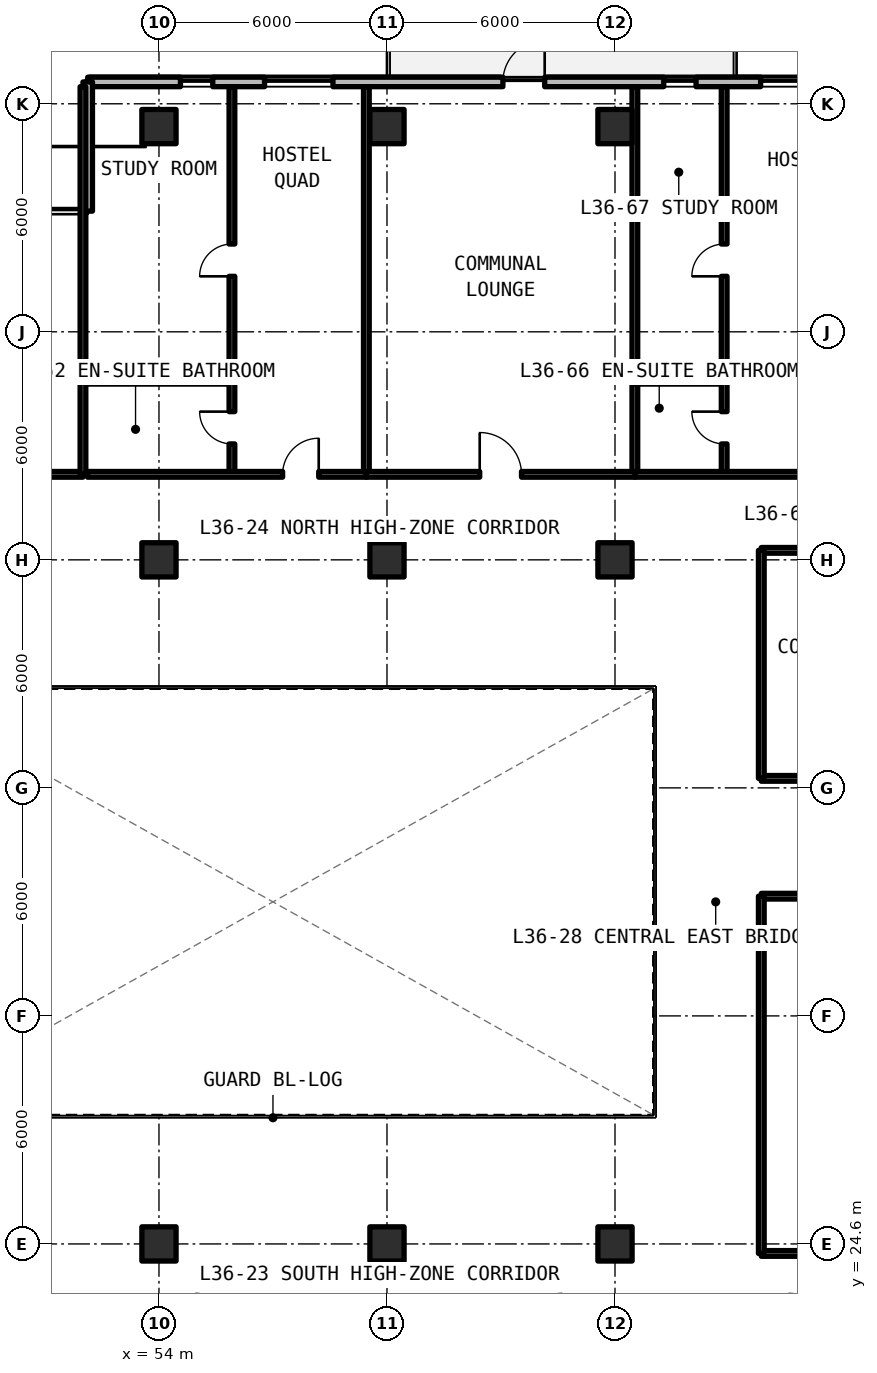
"""IFC4 building model, lengths in metres.
Left out: names, types, materials, properties, quantities, classifications, styles, units other than length and angle.
Written with IfcOpenShell. Run it as: python <this file> out.ifc"""

import sys

from ifc_helpers import new_model, si_unit, direction, frame, frame_2d, origin, origin_2d, place, context, subcontext, project, spatial, rectangle, extrude, element, fill, save


model = new_model("IFC4")
c1 = context("Model", 3, precision=1e-05, world=origin(), true_north=direction((0.0, 1.0)))
c2 = subcontext(c1, "Body", "Model", "MODEL_VIEW")
j1 = project(units=[si_unit("LENGTHUNIT", "METRE"), si_unit("PLANEANGLEUNIT", "RADIAN")], contexts=[c1])
p1 = place(None, origin())
s1 = spatial("IfcSite", under=j1, at=p1, CompositionType="ELEMENT")
p2 = place(p1, origin())
s2 = spatial("IfcBuilding", under=s1, at=p2, CompositionType="ELEMENT")
p3 = place(p2, frame((0.0, 0.0, 132.0)))
s3 = spatial("IfcBuildingStorey", under=s2, at=p3, CompositionType="ELEMENT", Elevation=132.0)
for number, where, z_axis, x_axis in (
    (1, (54.0, 24.6, 0.0), (0.0, 0.0, 1.0), (1.0, 0.0, 0.0)),
    (2, (54.0, 42.6, 0.0), (0.0, 0.0, 1.0), (1.0, 0.0, 0.0)),
    (3, (60.0, 24.6, 0.0), (0.0, 0.0, 1.0), (1.0, 0.0, 0.0)),
    (4, (60.0, 42.6, 0.0), (0.0, 0.0, 1.0), (1.0, 0.0, 0.0)),
    (5, (66.0, 24.6, 0.0), (0.0, 0.0, 1.0), (1.0, 0.0, 0.0)),
    (6, (66.0, 42.6, 0.0), (0.0, 0.0, 1.0), (1.0, 0.0, 0.0)),
    (7, (54.0, 54.0, 0.0), (0.0, 0.0, 1.0), (1.0, 0.0, 0.0)),
    (8, (60.0, 54.0, 0.0), (0.0, 0.0, 1.0), (1.0, 0.0, 0.0)),
    (9, (66.0, 54.0, 0.0), (0.0, 0.0, 1.0), (1.0, 0.0, 0.0)),
):
    element("IfcColumn", number, at=place(p3, frame(where, z_axis=z_axis, x_axis=x_axis)), inside=s3, PredefinedType="COLUMN", context=c2, shape_type="SweptSolid", body=[
        extrude(rectangle(XDim=0.9, YDim=0.9, at=origin_2d()), origin(), (0.0, 0.0, 1.0), 3.3),
    ])
p4 = place(p3, frame((95.748, 55.175, 0.0), z_axis=(0.0, 0.0, 1.0), x_axis=(-1.0, 0.0, 0.0)))
e10 = element("IfcWall", 10, at=p4, inside=s3, PredefinedType="SOLIDWALL", context=c2, shape_type="SweptSolid", body=[
    extrude(rectangle(XDim=43.623, YDim=0.25, at=frame_2d((21.812, 0.0))), origin(), (0.0, 0.0, 1.0), 3.08),
])
p5 = place(p4, frame((31.598, 0.0, 0.0)))
e11 = element("IfcOpeningElement", 11, at=p5, cuts=e10, PredefinedType="OPENING", context=c2, shape_type="SweptSolid", body=[
    extrude(rectangle(XDim=1.1, YDim=2.15, at=frame_2d((0.55, 1.075))), frame((0.0, 0.135, 0.0), z_axis=(0.0, -1.0, 0.0), x_axis=(1.0, 0.0, 0.0)), (0.0, 0.0, 1.0), 0.27),
])
p6 = place(p4, frame((15.398, 0.0, 0.0)))
e12 = element("IfcOpeningElement", 12, at=p6, cuts=e10, PredefinedType="OPENING", context=c2, shape_type="SweptSolid", body=[
    extrude(rectangle(XDim=1.1, YDim=2.15, at=frame_2d((0.55, 1.075))), frame((0.0, 0.135, 0.0), z_axis=(0.0, -1.0, 0.0), x_axis=(1.0, 0.0, 0.0)), (0.0, 0.0, 1.0), 0.27),
])
p7 = place(p4, frame((40.333, 0.0, 0.78)))
e13 = element("IfcOpeningElement", 13, at=p7, cuts=e10, PredefinedType="OPENING", context=c2, shape_type="SweptSolid", body=[
    extrude(rectangle(XDim=0.85, YDim=1.65, at=frame_2d((0.425, 0.825))), frame((0.0, 0.135, 0.0), z_axis=(0.0, -1.0, 0.0), x_axis=(1.0, 0.0, 0.0)), (0.0, 0.0, 1.0), 0.27),
])
p8 = place(p4, frame((37.17, 0.0, 0.78)))
e14 = element("IfcOpeningElement", 14, at=p8, cuts=e10, PredefinedType="OPENING", context=c2, shape_type="SweptSolid", body=[
    extrude(rectangle(XDim=1.8, YDim=1.66, at=frame_2d((0.9, 0.83))), frame((0.0, 0.135, 0.0), z_axis=(0.0, -1.0, 0.0), x_axis=(1.0, 0.0, 0.0)), (0.0, 0.0, 1.0), 0.27),
])
p9 = place(p4, frame((27.615, 0.0, 0.78)))
e15 = element("IfcOpeningElement", 15, at=p9, cuts=e10, PredefinedType="OPENING", context=c2, shape_type="SweptSolid", body=[
    extrude(rectangle(XDim=0.85, YDim=1.65, at=frame_2d((0.425, 0.825))), frame((0.0, 0.135, 0.0), z_axis=(0.0, -1.0, 0.0), x_axis=(1.0, 0.0, 0.0)), (0.0, 0.0, 1.0), 0.27),
])
p10 = place(p4, frame((24.516, 0.0, 0.78)))
e16 = element("IfcOpeningElement", 16, at=p10, cuts=e10, PredefinedType="OPENING", context=c2, shape_type="SweptSolid", body=[
    extrude(rectangle(XDim=1.4, YDim=1.65, at=frame_2d((0.7, 0.825))), frame((0.0, 0.135, 0.0), z_axis=(0.0, -1.0, 0.0), x_axis=(1.0, 0.0, 0.0)), (0.0, 0.0, 1.0), 0.27),
])
p11 = place(p4, frame((20.208, 0.0, 0.78)))
e17 = element("IfcOpeningElement", 17, at=p11, cuts=e10, PredefinedType="OPENING", context=c2, shape_type="SweptSolid", body=[
    extrude(rectangle(XDim=0.85, YDim=1.65, at=frame_2d((0.425, 0.825))), frame((0.0, 0.135, 0.0), z_axis=(0.0, -1.0, 0.0), x_axis=(1.0, 0.0, 0.0)), (0.0, 0.0, 1.0), 0.27),
])
p12 = place(p4, frame((12.6, 0.0, 0.78)))
e18 = element("IfcOpeningElement", 18, at=p12, cuts=e10, PredefinedType="OPENING", context=c2, shape_type="SweptSolid", body=[
    extrude(rectangle(XDim=1.4, YDim=1.65, at=frame_2d((0.7, 0.825))), frame((0.0, 0.135, 0.0), z_axis=(0.0, -1.0, 0.0), x_axis=(1.0, 0.0, 0.0)), (0.0, 0.0, 1.0), 0.27),
])
p13 = place(p4, frame((7.831, 0.0, 0.78)))
e19 = element("IfcOpeningElement", 19, at=p13, cuts=e10, PredefinedType="OPENING", context=c2, shape_type="SweptSolid", body=[
    extrude(rectangle(XDim=1.4, YDim=1.65, at=frame_2d((0.7, 0.825))), frame((0.0, 0.135, 0.0), z_axis=(0.0, -1.0, 0.0), x_axis=(1.0, 0.0, 0.0)), (0.0, 0.0, 1.0), 0.27),
])
p14 = place(p4, frame((4.286, 0.0, 0.78)))
e20 = element("IfcOpeningElement", 20, at=p14, cuts=e10, PredefinedType="OPENING", context=c2, shape_type="SweptSolid", body=[
    extrude(rectangle(XDim=0.85, YDim=1.65, at=frame_2d((0.425, 0.825))), frame((0.0, 0.135, 0.0), z_axis=(0.0, -1.0, 0.0), x_axis=(1.0, 0.0, 0.0)), (0.0, 0.0, 1.0), 0.27),
])
p15 = place(p4, frame((1.098, 0.0, 0.78)))
e21 = element("IfcOpeningElement", 21, at=p15, cuts=e10, PredefinedType="OPENING", context=c2, shape_type="SweptSolid", body=[
    extrude(rectangle(XDim=1.8, YDim=1.66, at=frame_2d((0.9, 0.83))), frame((0.0, 0.135, 0.0), z_axis=(0.0, -1.0, 0.0), x_axis=(1.0, 0.0, 0.0)), (0.0, 0.0, 1.0), 0.27),
])
p16 = place(p3, frame((52.125, 55.175, 0.0), z_axis=(0.0, 0.0, 1.0), x_axis=(0.0, -1.0, 0.0)))
e22 = element("IfcWall", 22, at=p16, inside=s3, PredefinedType="SOLIDWALL", context=c2, shape_type="SweptSolid", body=[
    extrude(rectangle(XDim=3.4, YDim=0.25, at=frame_2d((1.7, 0.0))), origin(), (0.0, 0.0, 1.0), 3.08),
])
p17 = place(p3, frame((69.85, 24.35, 0.0), z_axis=(0.0, 0.0, 1.0), x_axis=(1.0, 0.0, 0.0)))
e23 = element("IfcWall", 23, at=p17, inside=s3, PredefinedType="SOLIDWALL", context=c2, shape_type="SweptSolid", body=[
    extrude(rectangle(XDim=7.88, YDim=0.15, at=frame_2d((3.94, 0.0))), origin(), (0.0, 0.0, 1.0), 2.35),
])
p18 = place(p3, frame((69.85, 33.75, 0.0), z_axis=(0.0, 0.0, 1.0), x_axis=(1.0, 0.0, 0.0)))
e24 = element("IfcWall", 24, at=p18, inside=s3, PredefinedType="SOLIDWALL", context=c2, shape_type="SweptSolid", body=[
    extrude(rectangle(XDim=7.88, YDim=0.15, at=frame_2d((3.94, 0.0))), origin(), (0.0, 0.0, 1.0), 2.35),
])
p19 = place(p18, frame((3.465, 0.0, 0.0)))
e25 = element("IfcOpeningElement", 25, at=p19, cuts=e24, PredefinedType="OPENING", context=c2, shape_type="SweptSolid", body=[
    extrude(rectangle(XDim=0.95, YDim=2.15, at=frame_2d((0.475, 1.075))), frame((0.0, 0.085, 0.0), z_axis=(0.0, -1.0, 0.0), x_axis=(1.0, 0.0, 0.0)), (0.0, 0.0, 1.0), 0.17),
])
p20 = place(p3, frame((69.85, 24.35, 0.0), z_axis=(0.0, 0.0, 1.0), x_axis=(0.0, 1.0, 0.0)))
e26 = element("IfcWall", 26, at=p20, inside=s3, PredefinedType="SOLIDWALL", context=c2, shape_type="SweptSolid", body=[
    extrude(rectangle(XDim=9.4, YDim=0.15, at=frame_2d((4.7, 0.0))), origin(), (0.0, 0.0, 1.0), 2.35),
])
p21 = place(p3, frame((69.85, 36.85, 0.0), z_axis=(0.0, 0.0, 1.0), x_axis=(1.0, 0.0, 0.0)))
e27 = element("IfcWall", 27, at=p21, inside=s3, PredefinedType="SOLIDWALL", context=c2, shape_type="SweptSolid", body=[
    extrude(rectangle(XDim=7.88, YDim=0.15, at=frame_2d((3.94, 0.0))), origin(), (0.0, 0.0, 1.0), 2.35),
])
p22 = place(p21, frame((3.465, 0.0, 0.0)))
e28 = element("IfcOpeningElement", 28, at=p22, cuts=e27, PredefinedType="OPENING", context=c2, shape_type="SweptSolid", body=[
    extrude(rectangle(XDim=0.95, YDim=2.15, at=frame_2d((0.475, 1.075))), frame((0.0, 0.085, 0.0), z_axis=(0.0, -1.0, 0.0), x_axis=(1.0, 0.0, 0.0)), (0.0, 0.0, 1.0), 0.17),
])
p23 = place(p3, frame((69.85, 42.85, 0.0), z_axis=(0.0, 0.0, 1.0), x_axis=(1.0, 0.0, 0.0)))
e29 = element("IfcWall", 29, at=p23, inside=s3, PredefinedType="SOLIDWALL", context=c2, shape_type="SweptSolid", body=[
    extrude(rectangle(XDim=7.88, YDim=0.15, at=frame_2d((3.94, 0.0))), origin(), (0.0, 0.0, 1.0), 2.35),
])
p24 = place(p3, frame((69.85, 36.85, 0.0), z_axis=(0.0, 0.0, 1.0), x_axis=(0.0, 1.0, 0.0)))
e30 = element("IfcWall", 30, at=p24, inside=s3, PredefinedType="SOLIDWALL", context=c2, shape_type="SweptSolid", body=[
    extrude(rectangle(XDim=6.0, YDim=0.15, at=frame_2d((3.0, 0.0))), origin(), (0.0, 0.0, 1.0), 2.35),
])
p25 = place(p3, frame((43.6, 44.85, 0.0), z_axis=(0.0, 0.0, 1.0), x_axis=(1.0, 0.0, 0.0)))
e31 = element("IfcWall", 31, at=p25, inside=s3, PredefinedType="SOLIDWALL", context=c2, shape_type="SweptSolid", body=[
    extrude(rectangle(XDim=8.4, YDim=0.15, at=frame_2d((4.2, 0.0))), origin(), (0.0, 0.0, 1.0), 2.35),
])
p26 = place(p25, frame((3.65, 0.0, 0.0)))
e32 = element("IfcOpeningElement", 32, at=p26, cuts=e31, PredefinedType="OPENING", context=c2, shape_type="SweptSolid", body=[
    extrude(rectangle(XDim=1.1, YDim=2.15, at=frame_2d((0.55, 1.075))), frame((0.0, 0.085, 0.0), z_axis=(0.0, -1.0, 0.0), x_axis=(1.0, 0.0, 0.0)), (0.0, 0.0, 1.0), 0.17),
])
for number, where, z_axis, x_axis in (
    (33, (52.0, 44.85, 0.0), (0.0, 0.0, 1.0), (0.0, 1.0, 0.0)),
    (34, (59.457, 44.85, 0.0), (0.0, 0.0, 1.0), (0.0, 1.0, 0.0)),
):
    element("IfcWall", number, at=place(p3, frame(where, z_axis=z_axis, x_axis=x_axis)), inside=s3, PredefinedType="SOLIDWALL", context=c2, shape_type="SweptSolid", body=[
        extrude(rectangle(XDim=10.2, YDim=0.15, at=frame_2d((5.1, 0.0))), origin(), (0.0, 0.0, 1.0), 2.35),
    ])
p27 = place(p3, frame((52.12, 47.3, 0.0), z_axis=(0.0, 0.0, 1.0), x_axis=(1.0, 0.0, 0.0)))
e35 = element("IfcWall", 35, at=p27, inside=s3, PredefinedType="PARTITIONING", context=c2, shape_type="SweptSolid", body=[
    extrude(rectangle(XDim=3.8, YDim=0.15, at=frame_2d((1.9, 0.0))), origin(), (0.0, 0.0, 1.0), 2.35),
])
p28 = place(p3, frame((55.92, 44.85, 0.0), z_axis=(0.0, 0.0, 1.0), x_axis=(0.0, 1.0, 0.0)))
e36 = element("IfcWall", 36, at=p28, inside=s3, PredefinedType="PARTITIONING", context=c2, shape_type="SweptSolid", body=[
    extrude(rectangle(XDim=10.2, YDim=0.15, at=frame_2d((5.1, 0.0))), origin(), (0.0, 0.0, 1.0), 2.35),
])
p29 = place(p28, frame((0.8, 0.0, 0.0)))
e37 = element("IfcOpeningElement", 37, at=p29, cuts=e36, PredefinedType="OPENING", context=c2, shape_type="SweptSolid", body=[
    extrude(rectangle(XDim=0.85, YDim=2.1, at=frame_2d((0.425, 1.05))), frame((0.0, 0.085, 0.0), z_axis=(0.0, -1.0, 0.0), x_axis=(1.0, 0.0, 0.0)), (0.0, 0.0, 1.0), 0.17),
])
p30 = place(p28, frame((5.21, 0.0, 0.0)))
e38 = element("IfcOpeningElement", 38, at=p30, cuts=e36, PredefinedType="OPENING", context=c2, shape_type="SweptSolid", body=[
    extrude(rectangle(XDim=0.85, YDim=2.1, at=frame_2d((0.425, 1.05))), frame((0.0, 0.085, 0.0), z_axis=(0.0, -1.0, 0.0), x_axis=(1.0, 0.0, 0.0)), (0.0, 0.0, 1.0), 0.17),
])
p31 = place(p3, frame((52.12, 44.85, 0.0), z_axis=(0.0, 0.0, 1.0), x_axis=(1.0, 0.0, 0.0)))
e39 = element("IfcWall", 39, at=p31, inside=s3, PredefinedType="SOLIDWALL", context=c2, shape_type="SweptSolid", body=[
    extrude(rectangle(XDim=7.337, YDim=0.15, at=frame_2d((3.668, 0.0))), origin(), (0.0, 0.0, 1.0), 2.35),
])
p32 = place(p31, frame((5.134, 0.0, 0.0)))
e40 = element("IfcOpeningElement", 40, at=p32, cuts=e39, PredefinedType="OPENING", context=c2, shape_type="SweptSolid", body=[
    extrude(rectangle(XDim=0.95, YDim=2.15, at=frame_2d((0.475, 1.075))), frame((0.0, 0.085, 0.0), z_axis=(0.0, -1.0, 0.0), x_axis=(1.0, 0.0, 0.0)), (0.0, 0.0, 1.0), 0.17),
])
p33 = place(p3, frame((66.523, 44.85, 0.0), z_axis=(0.0, 0.0, 1.0), x_axis=(0.0, 1.0, 0.0)))
e41 = element("IfcWall", 41, at=p33, inside=s3, PredefinedType="SOLIDWALL", context=c2, shape_type="SweptSolid", body=[
    extrude(rectangle(XDim=10.2, YDim=0.15, at=frame_2d((5.1, 0.0))), origin(), (0.0, 0.0, 1.0), 2.35),
])
p34 = place(p3, frame((59.457, 44.85, 0.0), z_axis=(0.0, 0.0, 1.0), x_axis=(1.0, 0.0, 0.0)))
e42 = element("IfcWall", 42, at=p34, inside=s3, PredefinedType="SOLIDWALL", context=c2, shape_type="SweptSolid", body=[
    extrude(rectangle(XDim=7.065, YDim=0.15, at=frame_2d((3.533, 0.0))), origin(), (0.0, 0.0, 1.0), 2.35),
])
p35 = place(p34, frame((2.983, 0.0, 0.0)))
e43 = element("IfcOpeningElement", 43, at=p35, cuts=e42, PredefinedType="OPENING", context=c2, shape_type="SweptSolid", body=[
    extrude(rectangle(XDim=1.1, YDim=2.15, at=frame_2d((0.55, 1.075))), frame((0.0, 0.085, 0.0), z_axis=(0.0, -1.0, 0.0), x_axis=(1.0, 0.0, 0.0)), (0.0, 0.0, 1.0), 0.17),
])
p36 = place(p3, frame((66.523, 47.3, 0.0), z_axis=(0.0, 0.0, 1.0), x_axis=(1.0, 0.0, 0.0)))
e44 = element("IfcWall", 44, at=p36, inside=s3, PredefinedType="PARTITIONING", context=c2, shape_type="SweptSolid", body=[
    extrude(rectangle(XDim=2.35, YDim=0.15, at=frame_2d((1.175, 0.0))), origin(), (0.0, 0.0, 1.0), 2.35),
])
p37 = place(p3, frame((68.873, 44.85, 0.0), z_axis=(0.0, 0.0, 1.0), x_axis=(0.0, 1.0, 0.0)))
e45 = element("IfcWall", 45, at=p37, inside=s3, PredefinedType="PARTITIONING", context=c2, shape_type="SweptSolid", body=[
    extrude(rectangle(XDim=10.2, YDim=0.15, at=frame_2d((5.1, 0.0))), origin(), (0.0, 0.0, 1.0), 2.35),
])
p38 = place(p37, frame((0.8, 0.0, 0.0)))
e46 = element("IfcOpeningElement", 46, at=p38, cuts=e45, PredefinedType="OPENING", context=c2, shape_type="SweptSolid", body=[
    extrude(rectangle(XDim=0.85, YDim=2.1, at=frame_2d((0.425, 1.05))), frame((0.0, 0.085, 0.0), z_axis=(0.0, -1.0, 0.0), x_axis=(1.0, 0.0, 0.0)), (0.0, 0.0, 1.0), 0.17),
])
p39 = place(p37, frame((5.21, 0.0, 0.0)))
e47 = element("IfcOpeningElement", 47, at=p39, cuts=e45, PredefinedType="OPENING", context=c2, shape_type="SweptSolid", body=[
    extrude(rectangle(XDim=0.85, YDim=2.1, at=frame_2d((0.425, 1.05))), frame((0.0, 0.085, 0.0), z_axis=(0.0, -1.0, 0.0), x_axis=(1.0, 0.0, 0.0)), (0.0, 0.0, 1.0), 0.17),
])
p40 = place(p3, frame((66.523, 44.85, 0.0), z_axis=(0.0, 0.0, 1.0), x_axis=(1.0, 0.0, 0.0)))
e48 = element("IfcWall", 48, at=p40, inside=s3, PredefinedType="SOLIDWALL", context=c2, shape_type="SweptSolid", body=[
    extrude(rectangle(XDim=7.609, YDim=0.15, at=frame_2d((3.804, 0.0))), origin(), (0.0, 0.0, 1.0), 2.35),
])
p41 = place(p40, frame((4.544, 0.0, 0.0)))
e49 = element("IfcOpeningElement", 49, at=p41, cuts=e48, PredefinedType="OPENING", context=c2, shape_type="SweptSolid", body=[
    extrude(rectangle(XDim=0.95, YDim=2.15, at=frame_2d((0.475, 1.075))), frame((0.0, 0.085, 0.0), z_axis=(0.0, -1.0, 0.0), x_axis=(1.0, 0.0, 0.0)), (0.0, 0.0, 1.0), 0.17),
])
p42 = place(p5, frame((1.1, 0.0, 0.0), z_axis=(0.0, 0.0, 1.0), x_axis=(-1.0, 0.0, 0.0)))
e50 = element("IfcDoor", 50, at=p42, inside=s3, OperationType="SINGLE_SWING_RIGHT", PredefinedType="DOOR", context=c2, shape_type="SweptSolid", body=[
    extrude(rectangle(XDim=1.1, YDim=2.15, at=frame_2d((0.55, 1.075))), frame((0.0, 0.025, 0.0), z_axis=(0.0, -1.0, 0.0), x_axis=(1.0, 0.0, 0.0)), (0.0, 0.0, 1.0), 0.05),
])
fill(e11, e50)
p43 = place(p7, origin())
e51 = element("IfcWindow", 51, at=p43, inside=s3, PartitioningType="SINGLE_PANEL", PredefinedType="WINDOW", context=c2, shape_type="SweptSolid", body=[
    extrude(rectangle(XDim=0.85, YDim=1.65, at=frame_2d((0.425, 0.825))), frame((0.0, 0.03, 0.0), z_axis=(0.0, -1.0, 0.0), x_axis=(1.0, 0.0, 0.0)), (0.0, 0.0, 1.0), 0.06),
])
fill(e13, e51)
p44 = place(p8, origin())
e52 = element("IfcWindow", 52, at=p44, inside=s3, PartitioningType="SINGLE_PANEL", PredefinedType="WINDOW", context=c2, shape_type="SweptSolid", body=[
    extrude(rectangle(XDim=1.8, YDim=1.66, at=frame_2d((0.9, 0.83))), frame((0.0, 0.03, 0.0), z_axis=(0.0, -1.0, 0.0), x_axis=(1.0, 0.0, 0.0)), (0.0, 0.0, 1.0), 0.06),
])
fill(e14, e52)
p45 = place(p9, origin())
e53 = element("IfcWindow", 53, at=p45, inside=s3, PartitioningType="SINGLE_PANEL", PredefinedType="WINDOW", context=c2, shape_type="SweptSolid", body=[
    extrude(rectangle(XDim=0.85, YDim=1.65, at=frame_2d((0.425, 0.825))), frame((0.0, 0.03, 0.0), z_axis=(0.0, -1.0, 0.0), x_axis=(1.0, 0.0, 0.0)), (0.0, 0.0, 1.0), 0.06),
])
fill(e15, e53)
p46 = place(p10, origin())
e54 = element("IfcWindow", 54, at=p46, inside=s3, PartitioningType="SINGLE_PANEL", PredefinedType="WINDOW", context=c2, shape_type="SweptSolid", body=[
    extrude(rectangle(XDim=1.4, YDim=1.65, at=frame_2d((0.7, 0.825))), frame((0.0, 0.03, 0.0), z_axis=(0.0, -1.0, 0.0), x_axis=(1.0, 0.0, 0.0)), (0.0, 0.0, 1.0), 0.06),
])
fill(e16, e54)
p47 = place(p29, origin())
e55 = element("IfcDoor", 55, at=p47, inside=s3, OperationType="SINGLE_SWING_RIGHT", PredefinedType="DOOR", context=c2, shape_type="SweptSolid", body=[
    extrude(rectangle(XDim=0.85, YDim=2.1, at=frame_2d((0.425, 1.05))), frame((0.0, 0.025, 0.0), z_axis=(0.0, -1.0, 0.0), x_axis=(1.0, 0.0, 0.0)), (0.0, 0.0, 1.0), 0.05),
])
fill(e37, e55)
p48 = place(p30, origin())
e56 = element("IfcDoor", 56, at=p48, inside=s3, OperationType="SINGLE_SWING_LEFT", PredefinedType="DOOR", context=c2, shape_type="SweptSolid", body=[
    extrude(rectangle(XDim=0.85, YDim=2.1, at=frame_2d((0.425, 1.05))), frame((0.0, 0.025, 0.0), z_axis=(0.0, -1.0, 0.0), x_axis=(1.0, 0.0, 0.0)), (0.0, 0.0, 1.0), 0.05),
])
fill(e38, e56)
p49 = place(p32, origin())
e57 = element("IfcDoor", 57, at=p49, inside=s3, OperationType="SINGLE_SWING_RIGHT", PredefinedType="DOOR", context=c2, shape_type="SweptSolid", body=[
    extrude(rectangle(XDim=0.95, YDim=2.15, at=frame_2d((0.475, 1.075))), frame((0.0, 0.025, 0.0), z_axis=(0.0, -1.0, 0.0), x_axis=(1.0, 0.0, 0.0)), (0.0, 0.0, 1.0), 0.05),
])
fill(e40, e57)
p50 = place(p35, origin())
e58 = element("IfcDoor", 58, at=p50, inside=s3, OperationType="SINGLE_SWING_LEFT", PredefinedType="DOOR", context=c2, shape_type="SweptSolid", body=[
    extrude(rectangle(XDim=1.1, YDim=2.15, at=frame_2d((0.55, 1.075))), frame((0.0, 0.025, 0.0), z_axis=(0.0, -1.0, 0.0), x_axis=(1.0, 0.0, 0.0)), (0.0, 0.0, 1.0), 0.05),
])
fill(e43, e58)
p51 = place(p38, origin())
e59 = element("IfcDoor", 59, at=p51, inside=s3, OperationType="SINGLE_SWING_RIGHT", PredefinedType="DOOR", context=c2, shape_type="SweptSolid", body=[
    extrude(rectangle(XDim=0.85, YDim=2.1, at=frame_2d((0.425, 1.05))), frame((0.0, 0.025, 0.0), z_axis=(0.0, -1.0, 0.0), x_axis=(1.0, 0.0, 0.0)), (0.0, 0.0, 1.0), 0.05),
])
fill(e46, e59)
p52 = place(p39, origin())
e60 = element("IfcDoor", 60, at=p52, inside=s3, OperationType="SINGLE_SWING_LEFT", PredefinedType="DOOR", context=c2, shape_type="SweptSolid", body=[
    extrude(rectangle(XDim=0.85, YDim=2.1, at=frame_2d((0.425, 1.05))), frame((0.0, 0.025, 0.0), z_axis=(0.0, -1.0, 0.0), x_axis=(1.0, 0.0, 0.0)), (0.0, 0.0, 1.0), 0.05),
])
fill(e47, e60)
save(model, sys.argv[1])
